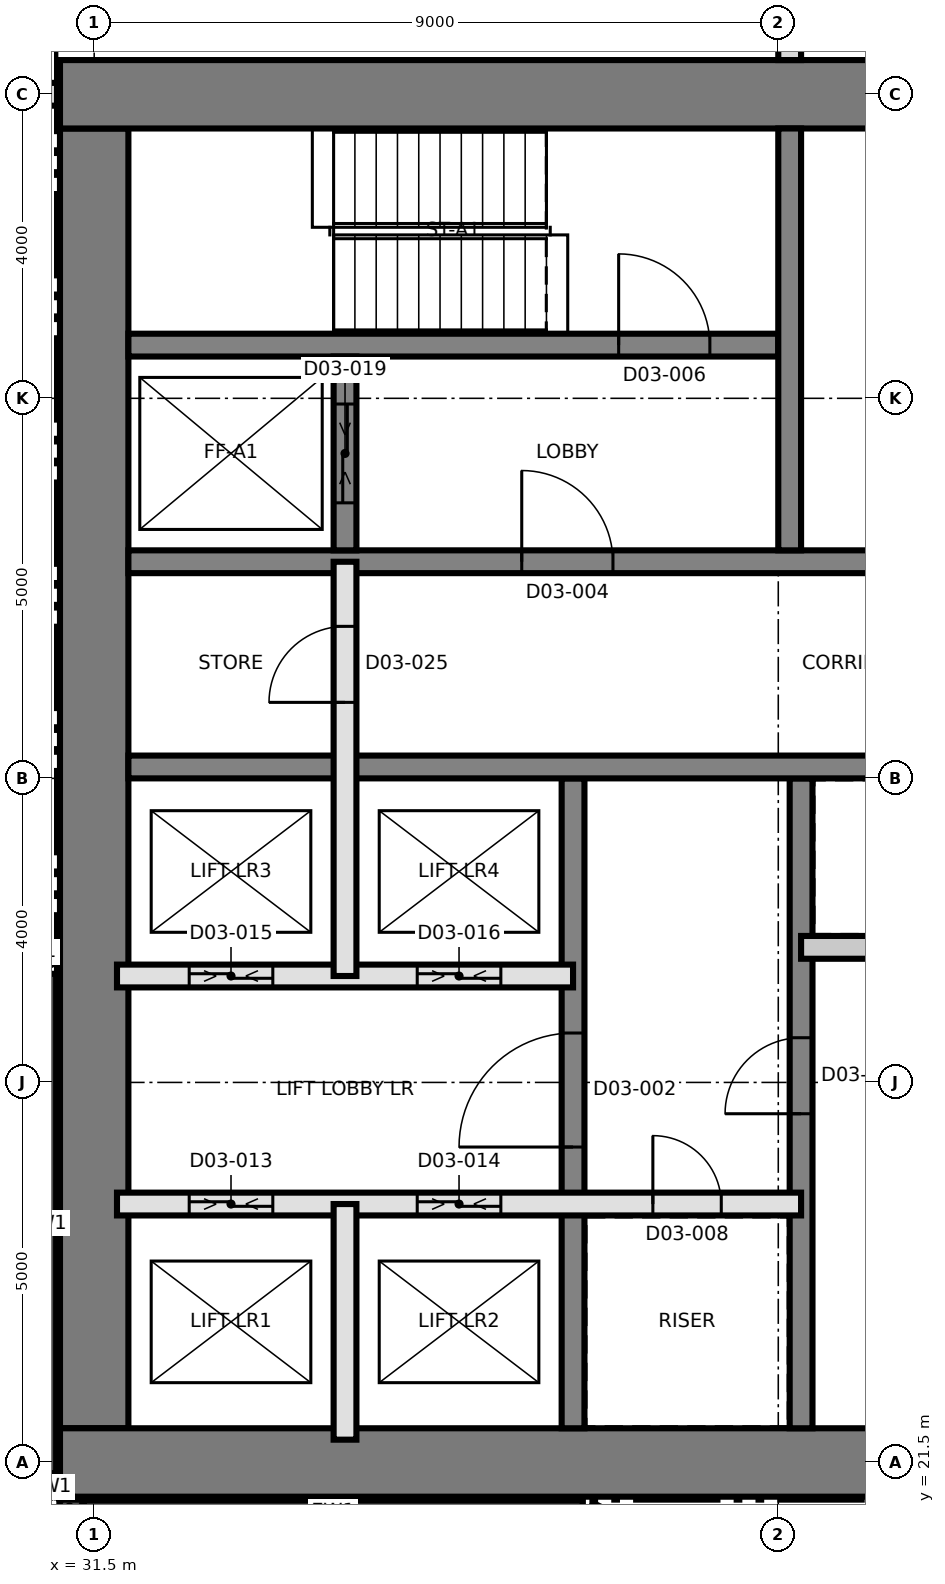
"""IFC4 building model, lengths in metres.
Left out: names, types, materials, properties, quantities, classifications, styles, units other than length and angle.
Written with IfcOpenShell. Run it as: python <this file> out.ifc"""

import sys

from ifc_helpers import new_model, si_unit, direction, frame, frame_2d, origin, place, context, subcontext, project, spatial, rectangle, extrude, element, fill, save


model = new_model("IFC4")
c1 = context("Model", 3, precision=1e-05, world=origin(), true_north=direction((0.0, 1.0)))
c2 = subcontext(c1, "Body", "Model", "MODEL_VIEW")
j1 = project(units=[si_unit("LENGTHUNIT", "METRE"), si_unit("PLANEANGLEUNIT", "RADIAN")], contexts=[c1])
p1 = place(None, origin())
s1 = spatial("IfcSite", under=j1, at=p1, CompositionType="ELEMENT")
p2 = place(p1, origin())
s2 = spatial("IfcBuilding", under=s1, at=p2, CompositionType="ELEMENT")
p3 = place(p2, frame((0.0, 0.0, 55.7)))
s3 = spatial("IfcBuildingStorey", under=s2, at=p3, CompositionType="ELEMENT", Elevation=55.7)
p4 = place(p3, frame((31.5, 21.95, 0.0), z_axis=(0.0, 0.0, 1.0), x_axis=(0.0, 1.0, 0.0)))
e1 = element("IfcWall", 1, at=p4, inside=s3, PredefinedType="SHEAR", context=c2, shape_type="SweptSolid", body=[
    extrude(rectangle(XDim=17.1, YDim=0.9, at=frame_2d((8.55, 0.0))), origin(), (0.0, 0.0, 1.0), 3.7),
])
p5 = place(p3, frame((31.05, 21.5, 0.0), z_axis=(0.0, 0.0, 1.0), x_axis=(1.0, 0.0, 0.0)))
e2 = element("IfcWall", 2, at=p5, inside=s3, PredefinedType="SHEAR", context=c2, shape_type="SweptSolid", body=[
    extrude(rectangle(XDim=27.0, YDim=0.9, at=frame_2d((13.5, 0.0))), origin(), (0.0, 0.0, 1.0), 3.7),
])
p6 = place(p3, frame((31.05, 39.5, 0.0), z_axis=(0.0, 0.0, 1.0), x_axis=(1.0, 0.0, 0.0)))
e3 = element("IfcWall", 3, at=p6, inside=s3, PredefinedType="SHEAR", context=c2, shape_type="SweptSolid", body=[
    extrude(rectangle(XDim=27.0, YDim=0.9, at=frame_2d((13.5, 0.0))), origin(), (0.0, 0.0, 1.0), 3.7),
])
p7 = place(p6, frame((10.65, 0.0, 0.0)))
e4 = element("IfcOpeningElement", 4, at=p7, cuts=e3, PredefinedType="OPENING", context=c2, shape_type="SweptSolid", body=[
    extrude(rectangle(XDim=1.2, YDim=2.1, at=frame_2d((0.6, 1.05))), frame((0.0, 0.46, 0.0), z_axis=(0.0, -1.0, 0.0), x_axis=(1.0, 0.0, 0.0)), (0.0, 0.0, 1.0), 0.92),
])
p8 = place(p3, frame((37.8, 21.95, 0.0), z_axis=(0.0, 0.0, 1.0), x_axis=(0.0, 1.0, 0.0)))
e5 = element("IfcWall", 5, at=p8, inside=s3, PredefinedType="SHEAR", context=c2, shape_type="SweptSolid", body=[
    extrude(rectangle(XDim=8.55, YDim=0.3, at=frame_2d((4.275, 0.0))), origin(), (0.0, 0.0, 1.0), 3.7),
])
p9 = place(p8, frame((3.7, 0.0, 0.0)))
e6 = element("IfcOpeningElement", 6, at=p9, cuts=e5, PredefinedType="OPENING", context=c2, shape_type="SweptSolid", body=[
    extrude(rectangle(XDim=1.5, YDim=2.1, at=frame_2d((0.75, 1.05))), frame((0.0, 0.16, 0.0), z_axis=(0.0, -1.0, 0.0), x_axis=(1.0, 0.0, 0.0)), (0.0, 0.0, 1.0), 0.32),
])
p10 = place(p3, frame((40.8, 21.95, 0.0), z_axis=(0.0, 0.0, 1.0), x_axis=(0.0, 1.0, 0.0)))
e7 = element("IfcWall", 7, at=p10, inside=s3, PredefinedType="SHEAR", context=c2, shape_type="SweptSolid", body=[
    extrude(rectangle(XDim=8.55, YDim=0.3, at=frame_2d((4.275, 0.0))), origin(), (0.0, 0.0, 1.0), 3.7),
])
p11 = place(p10, frame((4.138, 0.0, 0.0)))
e8 = element("IfcOpeningElement", 8, at=p11, cuts=e7, PredefinedType="OPENING", context=c2, shape_type="SweptSolid", body=[
    extrude(rectangle(XDim=1.0, YDim=2.1, at=frame_2d((0.5, 1.05))), frame((0.0, 0.16, 0.0), z_axis=(0.0, -1.0, 0.0), x_axis=(1.0, 0.0, 0.0)), (0.0, 0.0, 1.0), 0.32),
])
p12 = place(p3, frame((31.95, 30.65, 0.0), z_axis=(0.0, 0.0, 1.0), x_axis=(1.0, 0.0, 0.0)))
e9 = element("IfcWall", 9, at=p12, inside=s3, PredefinedType="SHEAR", context=c2, shape_type="SweptSolid", body=[
    extrude(rectangle(XDim=26.1, YDim=0.3, at=frame_2d((13.05, 0.0))), origin(), (0.0, 0.0, 1.0), 3.7),
])
p13 = place(p12, frame((24.55, 0.0, 0.0)))
e10 = element("IfcOpeningElement", 10, at=p13, cuts=e9, PredefinedType="OPENING", context=c2, shape_type="SweptSolid", body=[
    extrude(rectangle(XDim=1.0, YDim=2.1, at=frame_2d((0.5, 1.05))), frame((0.0, 0.16, 0.0), z_axis=(0.0, -1.0, 0.0), x_axis=(1.0, 0.0, 0.0)), (0.0, 0.0, 1.0), 0.32),
])
p14 = place(p12, frame((11.35, 0.0, 0.0)))
e11 = element("IfcOpeningElement", 11, at=p14, cuts=e9, PredefinedType="OPENING", context=c2, shape_type="SweptSolid", body=[
    extrude(rectangle(XDim=1.0, YDim=2.1, at=frame_2d((0.5, 1.05))), frame((0.0, 0.16, 0.0), z_axis=(0.0, -1.0, 0.0), x_axis=(1.0, 0.0, 0.0)), (0.0, 0.0, 1.0), 0.32),
])
p15 = place(p3, frame((31.95, 33.35, 0.0), z_axis=(0.0, 0.0, 1.0), x_axis=(1.0, 0.0, 0.0)))
e12 = element("IfcWall", 12, at=p15, inside=s3, PredefinedType="SHEAR", context=c2, shape_type="SweptSolid", body=[
    extrude(rectangle(XDim=26.1, YDim=0.3, at=frame_2d((13.05, 0.0))), origin(), (0.0, 0.0, 1.0), 3.7),
])
p16 = place(p15, frame((13.125, 0.0, 0.0)))
e13 = element("IfcOpeningElement", 13, at=p16, cuts=e12, PredefinedType="OPENING", context=c2, shape_type="SweptSolid", body=[
    extrude(rectangle(XDim=1.4, YDim=2.1, at=frame_2d((0.7, 1.05))), frame((0.0, 0.16, 0.0), z_axis=(0.0, -1.0, 0.0), x_axis=(1.0, 0.0, 0.0)), (0.0, 0.0, 1.0), 0.32),
])
p17 = place(p15, frame((5.175, 0.0, 0.0)))
e14 = element("IfcOpeningElement", 14, at=p17, cuts=e12, PredefinedType="OPENING", context=c2, shape_type="SweptSolid", body=[
    extrude(rectangle(XDim=1.2, YDim=2.1, at=frame_2d((0.6, 1.05))), frame((0.0, 0.16, 0.0), z_axis=(0.0, -1.0, 0.0), x_axis=(1.0, 0.0, 0.0)), (0.0, 0.0, 1.0), 0.32),
])
p18 = place(p15, frame((19.725, 0.0, 0.0)))
e15 = element("IfcOpeningElement", 15, at=p18, cuts=e12, PredefinedType="OPENING", context=c2, shape_type="SweptSolid", body=[
    extrude(rectangle(XDim=1.2, YDim=2.1, at=frame_2d((0.6, 1.05))), frame((0.0, 0.16, 0.0), z_axis=(0.0, -1.0, 0.0), x_axis=(1.0, 0.0, 0.0)), (0.0, 0.0, 1.0), 0.32),
])
p19 = place(p3, frame((31.95, 36.2, 0.0), z_axis=(0.0, 0.0, 1.0), x_axis=(1.0, 0.0, 0.0)))
e16 = element("IfcWall", 16, at=p19, inside=s3, PredefinedType="SHEAR", context=c2, shape_type="SweptSolid", body=[
    extrude(rectangle(XDim=8.55, YDim=0.3, at=frame_2d((4.275, 0.0))), origin(), (0.0, 0.0, 1.0), 3.7),
])
p20 = place(p19, frame((6.45, 0.0, 0.0)))
e17 = element("IfcOpeningElement", 17, at=p20, cuts=e16, PredefinedType="OPENING", context=c2, shape_type="SweptSolid", body=[
    extrude(rectangle(XDim=1.2, YDim=2.1, at=frame_2d((0.6, 1.05))), frame((0.0, 0.16, 0.0), z_axis=(0.0, -1.0, 0.0), x_axis=(1.0, 0.0, 0.0)), (0.0, 0.0, 1.0), 0.32),
])
p21 = place(p3, frame((40.65, 33.5, 0.0), z_axis=(0.0, 0.0, 1.0), x_axis=(0.0, 1.0, 0.0)))
e18 = element("IfcWall", 18, at=p21, inside=s3, PredefinedType="SHEAR", context=c2, shape_type="SweptSolid", body=[
    extrude(rectangle(XDim=5.55, YDim=0.3, at=frame_2d((2.775, 0.0))), origin(), (0.0, 0.0, 1.0), 3.7),
])
p22 = place(p3, frame((34.8, 33.5, 0.0), z_axis=(0.0, 0.0, 1.0), x_axis=(0.0, 1.0, 0.0)))
e19 = element("IfcWall", 19, at=p22, inside=s3, PredefinedType="SHEAR", context=c2, shape_type="SweptSolid", body=[
    extrude(rectangle(XDim=2.55, YDim=0.3, at=frame_2d((1.275, 0.0))), origin(), (0.0, 0.0, 1.0), 3.7),
])
p23 = place(p22, frame((0.625, 0.0, 0.0)))
e20 = element("IfcOpeningElement", 20, at=p23, cuts=e19, PredefinedType="OPENING", context=c2, shape_type="SweptSolid", body=[
    extrude(rectangle(XDim=1.3, YDim=2.4, at=frame_2d((0.65, 1.2))), frame((0.0, 0.16, 0.0), z_axis=(0.0, -1.0, 0.0), x_axis=(1.0, 0.0, 0.0)), (0.0, 0.0, 1.0), 0.32),
])
p24 = place(p3, frame((30.85, 27.929, 0.0), z_axis=(0.0, 0.0, 1.0), x_axis=(0.0, -1.0, 0.0)))
e21 = element("IfcWall", 21, at=p24, inside=s3, PredefinedType="SOLIDWALL", context=c2, shape_type="SweptSolid", body=[
    extrude(rectangle(XDim=6.569, YDim=0.3, at=frame_2d((3.285, 0.0))), origin(), (0.0, 0.0, 1.0), 3.4),
])
for number, where, z_axis, x_axis in (
    (22, (30.861, 21.302, 0.0), (0.0, 0.0, 1.0), (0.383, -0.924, 0.0)),
    (23, (31.048, 20.967, 0.0), (0.0, 0.0, 1.0), (0.924, -0.383, 0.0)),
):
    element("IfcWall", number, at=place(p3, frame(where, z_axis=z_axis, x_axis=x_axis)), inside=s3, PredefinedType="SOLIDWALL", context=c2, shape_type="SweptSolid", body=[
        extrude(rectangle(XDim=0.275, YDim=0.3, at=frame_2d((0.138, 0.0))), origin(), (0.0, 0.0, 1.0), 3.4),
    ])
p25 = place(p3, frame((31.36, 20.85, 0.0), z_axis=(0.0, 0.0, 1.0), x_axis=(1.0, 0.0, 0.0)))
e24 = element("IfcWall", 24, at=p25, inside=s3, PredefinedType="SOLIDWALL", context=c2, shape_type="SweptSolid", body=[
    extrude(rectangle(XDim=6.569, YDim=0.3, at=frame_2d((3.285, 0.0))), origin(), (0.0, 0.0, 1.0), 3.4),
])
for number, where, z_axis, x_axis in (
    (25, (37.995, 20.834, 0.0), (0.0, 0.0, 1.0), (0.897, -0.442, 0.0)),
    (26, (30.613, 28.444, 0.0), (0.0, 0.0, 1.0), (0.442, -0.897, 0.0)),
):
    element("IfcWall", number, at=place(p3, frame(where, z_axis=z_axis, x_axis=x_axis)), inside=s3, PredefinedType="SOLIDWALL", context=c2, shape_type="SweptSolid", body=[
        extrude(rectangle(XDim=0.501, YDim=0.3, at=frame_2d((0.25, 0.0))), origin(), (0.0, 0.0, 1.0), 3.4),
    ])
p26 = place(p3, frame((31.8, 24.9, 0.0), z_axis=(0.0, 0.0, 1.0), x_axis=(1.0, 0.0, 0.0)))
e27 = element("IfcWall", 27, at=p26, inside=s3, PredefinedType="SOLIDWALL", context=c2, shape_type="SweptSolid", body=[
    extrude(rectangle(XDim=9.0, YDim=0.3, at=frame_2d((4.5, 0.0))), origin(), (0.0, 0.0, 1.0), 3.4),
])
p27 = place(p26, frame((7.05, 0.0, 0.0)))
e28 = element("IfcOpeningElement", 28, at=p27, cuts=e27, PredefinedType="OPENING", context=c2, shape_type="SweptSolid", body=[
    extrude(rectangle(XDim=0.9, YDim=2.1, at=frame_2d((0.45, 1.05))), frame((0.0, 0.16, 0.0), z_axis=(0.0, -1.0, 0.0), x_axis=(1.0, 0.0, 0.0)), (0.0, 0.0, 1.0), 0.32),
])
p28 = place(p26, frame((0.95, 0.0, 0.0)))
e29 = element("IfcOpeningElement", 29, at=p28, cuts=e27, PredefinedType="OPENING", context=c2, shape_type="SweptSolid", body=[
    extrude(rectangle(XDim=1.1, YDim=2.4, at=frame_2d((0.55, 1.2))), frame((0.0, 0.16, 0.0), z_axis=(0.0, -1.0, 0.0), x_axis=(1.0, 0.0, 0.0)), (0.0, 0.0, 1.0), 0.32),
])
p29 = place(p26, frame((3.95, 0.0, 0.0)))
e30 = element("IfcOpeningElement", 30, at=p29, cuts=e27, PredefinedType="OPENING", context=c2, shape_type="SweptSolid", body=[
    extrude(rectangle(XDim=1.1, YDim=2.4, at=frame_2d((0.55, 1.2))), frame((0.0, 0.16, 0.0), z_axis=(0.0, -1.0, 0.0), x_axis=(1.0, 0.0, 0.0)), (0.0, 0.0, 1.0), 0.32),
])
p30 = place(p3, frame((31.8, 27.9, 0.0), z_axis=(0.0, 0.0, 1.0), x_axis=(1.0, 0.0, 0.0)))
e31 = element("IfcWall", 31, at=p30, inside=s3, PredefinedType="SOLIDWALL", context=c2, shape_type="SweptSolid", body=[
    extrude(rectangle(XDim=6.0, YDim=0.3, at=frame_2d((3.0, 0.0))), origin(), (0.0, 0.0, 1.0), 3.4),
])
p31 = place(p30, frame((0.95, 0.0, 0.0)))
e32 = element("IfcOpeningElement", 32, at=p31, cuts=e31, PredefinedType="OPENING", context=c2, shape_type="SweptSolid", body=[
    extrude(rectangle(XDim=1.1, YDim=2.4, at=frame_2d((0.55, 1.2))), frame((0.0, 0.16, 0.0), z_axis=(0.0, -1.0, 0.0), x_axis=(1.0, 0.0, 0.0)), (0.0, 0.0, 1.0), 0.32),
])
p32 = place(p30, frame((3.95, 0.0, 0.0)))
e33 = element("IfcOpeningElement", 33, at=p32, cuts=e31, PredefinedType="OPENING", context=c2, shape_type="SweptSolid", body=[
    extrude(rectangle(XDim=1.1, YDim=2.4, at=frame_2d((0.55, 1.2))), frame((0.0, 0.16, 0.0), z_axis=(0.0, -1.0, 0.0), x_axis=(1.0, 0.0, 0.0)), (0.0, 0.0, 1.0), 0.32),
])
p33 = place(p3, frame((40.8, 28.277, 0.0), z_axis=(0.0, 0.0, 1.0), x_axis=(1.0, 0.0, 0.0)))
e34 = element("IfcWall", 34, at=p33, inside=s3, PredefinedType="PARTITIONING", context=c2, shape_type="SweptSolid", body=[
    extrude(rectangle(XDim=6.0, YDim=0.3, at=frame_2d((3.0, 0.0))), origin(), (0.0, 0.0, 1.0), 3.4),
])
p34 = place(p3, frame((34.8, 21.8, 0.0), z_axis=(0.0, 0.0, 1.0), x_axis=(0.0, 1.0, 0.0)))
e35 = element("IfcWall", 35, at=p34, inside=s3, PredefinedType="SOLIDWALL", context=c2, shape_type="SweptSolid", body=[
    extrude(rectangle(XDim=3.1, YDim=0.3, at=frame_2d((1.55, 0.0))), origin(), (0.0, 0.0, 1.0), 3.4),
])
p35 = place(p3, frame((34.8, 27.9, 0.0), z_axis=(0.0, 0.0, 1.0), x_axis=(0.0, 1.0, 0.0)))
e36 = element("IfcWall", 36, at=p35, inside=s3, PredefinedType="SOLIDWALL", context=c2, shape_type="SweptSolid", body=[
    extrude(rectangle(XDim=5.45, YDim=0.3, at=frame_2d((2.725, 0.0))), origin(), (0.0, 0.0, 1.0), 3.4),
])
p36 = place(p35, frame((3.6, 0.0, 0.0)))
e37 = element("IfcOpeningElement", 37, at=p36, cuts=e36, PredefinedType="OPENING", context=c2, shape_type="SweptSolid", body=[
    extrude(rectangle(XDim=1.0, YDim=2.1, at=frame_2d((0.5, 1.05))), frame((0.0, 0.16, 0.0), z_axis=(0.0, -1.0, 0.0), x_axis=(1.0, 0.0, 0.0)), (0.0, 0.0, 1.0), 0.32),
])
p37 = place(p3, frame((29.705, 39.5, 0.0), z_axis=(0.0, 0.0, 1.0), x_axis=(1.0, 0.0, 0.0)))
e38 = element("IfcWall", 38, at=p37, inside=s3, PredefinedType="PARTITIONING", context=c2, shape_type="SweptSolid", body=[
    extrude(rectangle(XDim=1.325, YDim=0.3, at=frame_2d((0.663, 0.0))), origin(), (0.0, 0.0, 1.0), 3.4),
])
p38 = place(p3, frame((40.65, 39.95, 0.0), z_axis=(0.0, 0.0, 1.0), x_axis=(0.0, 1.0, 0.0)))
e39 = element("IfcWall", 39, at=p38, inside=s3, PredefinedType="PARTITIONING", context=c2, shape_type="SweptSolid", body=[
    extrude(rectangle(XDim=37.05, YDim=0.3, at=frame_2d((18.525, 0.0))), origin(), (0.0, 0.0, 1.0), 3.4),
])
p39 = place(p38, frame((1.9, 0.0, 0.0)))
e40 = element("IfcOpeningElement", 40, at=p39, cuts=e39, PredefinedType="OPENING", context=c2, shape_type="SweptSolid", body=[
    extrude(rectangle(XDim=1.0, YDim=2.4, at=frame_2d((0.5, 1.2))), frame((0.0, 0.16, 0.0), z_axis=(0.0, -1.0, 0.0), x_axis=(1.0, 0.0, 0.0)), (0.0, 0.0, 1.0), 0.32),
])
p40 = place(p38, frame((14.2, 0.0, 0.0)))
e41 = element("IfcOpeningElement", 41, at=p40, cuts=e39, PredefinedType="OPENING", context=c2, shape_type="SweptSolid", body=[
    extrude(rectangle(XDim=1.0, YDim=2.4, at=frame_2d((0.5, 1.2))), frame((0.0, 0.16, 0.0), z_axis=(0.0, -1.0, 0.0), x_axis=(1.0, 0.0, 0.0)), (0.0, 0.0, 1.0), 0.32),
])
p41 = place(p38, frame((21.05, 0.0, 0.0)))
e42 = element("IfcOpeningElement", 42, at=p41, cuts=e39, PredefinedType="OPENING", context=c2, shape_type="SweptSolid", body=[
    extrude(rectangle(XDim=1.0, YDim=2.4, at=frame_2d((0.5, 1.2))), frame((0.0, 0.16, 0.0), z_axis=(0.0, -1.0, 0.0), x_axis=(1.0, 0.0, 0.0)), (0.0, 0.0, 1.0), 0.32),
])
p42 = place(p9, origin())
e43 = element("IfcDoor", 43, at=p42, inside=s3, OperationType="SINGLE_SWING_LEFT", PredefinedType="DOOR", context=c2, shape_type="SweptSolid", body=[
    extrude(rectangle(XDim=1.5, YDim=2.1, at=frame_2d((0.75, 1.05))), frame((0.0, 0.025, 0.0), z_axis=(0.0, -1.0, 0.0), x_axis=(1.0, 0.0, 0.0)), (0.0, 0.0, 1.0), 0.05),
])
fill(e6, e43)
p43 = place(p17, origin())
e44 = element("IfcDoor", 44, at=p43, inside=s3, OperationType="SINGLE_SWING_LEFT", PredefinedType="DOOR", context=c2, shape_type="SweptSolid", body=[
    extrude(rectangle(XDim=1.2, YDim=2.1, at=frame_2d((0.6, 1.05))), frame((0.0, 0.025, 0.0), z_axis=(0.0, -1.0, 0.0), x_axis=(1.0, 0.0, 0.0)), (0.0, 0.0, 1.0), 0.05),
])
fill(e14, e44)
p44 = place(p20, origin())
e45 = element("IfcDoor", 45, at=p44, inside=s3, OperationType="SINGLE_SWING_RIGHT", PredefinedType="DOOR", context=c2, shape_type="SweptSolid", body=[
    extrude(rectangle(XDim=1.2, YDim=2.1, at=frame_2d((0.6, 1.05))), frame((0.0, 0.025, 0.0), z_axis=(0.0, -1.0, 0.0), x_axis=(1.0, 0.0, 0.0)), (0.0, 0.0, 1.0), 0.05),
])
fill(e17, e45)
p45 = place(p27, origin())
e46 = element("IfcDoor", 46, at=p45, inside=s3, OperationType="SINGLE_SWING_LEFT", PredefinedType="DOOR", context=c2, shape_type="SweptSolid", body=[
    extrude(rectangle(XDim=0.9, YDim=2.1, at=frame_2d((0.45, 1.05))), frame((0.0, 0.025, 0.0), z_axis=(0.0, -1.0, 0.0), x_axis=(1.0, 0.0, 0.0)), (0.0, 0.0, 1.0), 0.05),
])
fill(e28, e46)
p46 = place(p28, origin())
e47 = element("IfcDoor", 47, at=p46, inside=s3, OperationType="SLIDING_TO_LEFT", PredefinedType="DOOR", context=c2, shape_type="SweptSolid", body=[
    extrude(rectangle(XDim=1.1, YDim=2.4, at=frame_2d((0.55, 1.2))), frame((0.0, 0.025, 0.0), z_axis=(0.0, -1.0, 0.0), x_axis=(1.0, 0.0, 0.0)), (0.0, 0.0, 1.0), 0.05),
])
fill(e29, e47)
p47 = place(p29, origin())
e48 = element("IfcDoor", 48, at=p47, inside=s3, OperationType="SLIDING_TO_LEFT", PredefinedType="DOOR", context=c2, shape_type="SweptSolid", body=[
    extrude(rectangle(XDim=1.1, YDim=2.4, at=frame_2d((0.55, 1.2))), frame((0.0, 0.025, 0.0), z_axis=(0.0, -1.0, 0.0), x_axis=(1.0, 0.0, 0.0)), (0.0, 0.0, 1.0), 0.05),
])
fill(e30, e48)
p48 = place(p31, origin())
e49 = element("IfcDoor", 49, at=p48, inside=s3, OperationType="SLIDING_TO_LEFT", PredefinedType="DOOR", context=c2, shape_type="SweptSolid", body=[
    extrude(rectangle(XDim=1.1, YDim=2.4, at=frame_2d((0.55, 1.2))), frame((0.0, 0.025, 0.0), z_axis=(0.0, -1.0, 0.0), x_axis=(1.0, 0.0, 0.0)), (0.0, 0.0, 1.0), 0.05),
])
fill(e32, e49)
p49 = place(p32, origin())
e50 = element("IfcDoor", 50, at=p49, inside=s3, OperationType="SLIDING_TO_LEFT", PredefinedType="DOOR", context=c2, shape_type="SweptSolid", body=[
    extrude(rectangle(XDim=1.1, YDim=2.4, at=frame_2d((0.55, 1.2))), frame((0.0, 0.025, 0.0), z_axis=(0.0, -1.0, 0.0), x_axis=(1.0, 0.0, 0.0)), (0.0, 0.0, 1.0), 0.05),
])
fill(e33, e50)
p50 = place(p23, origin())
e51 = element("IfcDoor", 51, at=p50, inside=s3, OperationType="SLIDING_TO_LEFT", PredefinedType="DOOR", context=c2, shape_type="SweptSolid", body=[
    extrude(rectangle(XDim=1.3, YDim=2.4, at=frame_2d((0.65, 1.2))), frame((0.0, 0.025, 0.0), z_axis=(0.0, -1.0, 0.0), x_axis=(1.0, 0.0, 0.0)), (0.0, 0.0, 1.0), 0.05),
])
fill(e20, e51)
p51 = place(p11, origin())
e52 = element("IfcDoor", 52, at=p51, inside=s3, OperationType="SINGLE_SWING_RIGHT", PredefinedType="DOOR", context=c2, shape_type="SweptSolid", body=[
    extrude(rectangle(XDim=1.0, YDim=2.1, at=frame_2d((0.5, 1.05))), frame((0.0, 0.025, 0.0), z_axis=(0.0, -1.0, 0.0), x_axis=(1.0, 0.0, 0.0)), (0.0, 0.0, 1.0), 0.05),
])
fill(e8, e52)
p52 = place(p36, origin())
e53 = element("IfcDoor", 53, at=p52, inside=s3, OperationType="SINGLE_SWING_LEFT", PredefinedType="DOOR", context=c2, shape_type="SweptSolid", body=[
    extrude(rectangle(XDim=1.0, YDim=2.1, at=frame_2d((0.5, 1.05))), frame((0.0, 0.025, 0.0), z_axis=(0.0, -1.0, 0.0), x_axis=(1.0, 0.0, 0.0)), (0.0, 0.0, 1.0), 0.05),
])
fill(e37, e53)
save(model, sys.argv[1])
